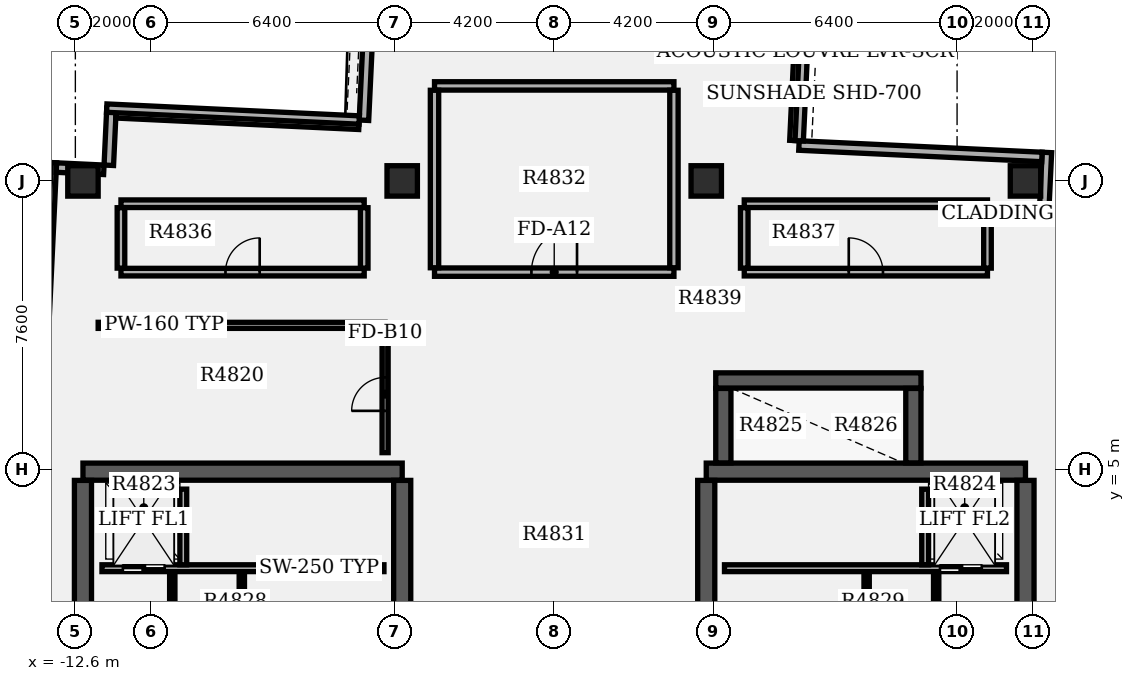
"""IFC4 building model, lengths in metres.
Left out: names, types, materials, properties, quantities, classifications, styles, units other than length and angle.
Written with IfcOpenShell. Run it as: python <this file> out.ifc"""

import sys

from ifc_helpers import new_model, si_unit, direction, frame, frame_2d, origin, origin_2d, place, context, subcontext, project, spatial, rectangle, extrude, element, fill, save


model = new_model("IFC4")
c1 = context("Model", 3, precision=1e-05, world=origin(), true_north=direction((0.0, 1.0)))
c2 = subcontext(c1, "Body", "Model", "MODEL_VIEW")
j1 = project(units=[si_unit("LENGTHUNIT", "METRE"), si_unit("PLANEANGLEUNIT", "RADIAN")], contexts=[c1])
p1 = place(None, origin())
s1 = spatial("IfcSite", under=j1, at=p1, CompositionType="ELEMENT")
p2 = place(p1, origin())
s2 = spatial("IfcBuilding", under=s1, at=p2, CompositionType="ELEMENT")
p3 = place(p2, frame((0.0, 0.0, 321.9)))
s3 = spatial("IfcBuildingStorey", under=s2, at=p3, CompositionType="ELEMENT", Elevation=321.9)
p4 = place(p3, frame((-12.4, 4.95, 0.0), z_axis=(0.0, 0.0, 1.0), x_axis=(1.0, 0.0, 0.0)))
e1 = element("IfcWall", 1, at=p4, inside=s3, PredefinedType="SHEAR", context=c2, shape_type="SweptSolid", body=[
    extrude(rectangle(XDim=8.4, YDim=0.45, at=frame_2d((4.2, 0.0))), origin(), (0.0, 0.0, 1.0), 4.12),
])
p5 = place(p3, frame((-12.4, -6.62, 0.0), z_axis=(0.0, 0.0, 1.0), x_axis=(0.0, 1.0, 0.0)))
e2 = element("IfcWall", 2, at=p5, inside=s3, PredefinedType="SHEAR", context=c2, shape_type="SweptSolid", body=[
    extrude(rectangle(XDim=11.34, YDim=0.45, at=frame_2d((5.67, 0.0))), origin(), (0.0, 0.0, 1.0), 4.12),
])
p6 = place(p3, frame((-4.0, -6.62, 0.0), z_axis=(0.0, 0.0, 1.0), x_axis=(0.0, 1.0, 0.0)))
e3 = element("IfcWall", 3, at=p6, inside=s3, PredefinedType="SHEAR", context=c2, shape_type="SweptSolid", body=[
    extrude(rectangle(XDim=11.34, YDim=0.45, at=frame_2d((5.67, 0.0))), origin(), (0.0, 0.0, 1.0), 4.12),
])
p7 = place(p6, frame((1.37, 0.0, 0.0)))
e4 = element("IfcOpeningElement", 4, at=p7, cuts=e3, PredefinedType="OPENING", context=c2, shape_type="SweptSolid", body=[
    extrude(rectangle(XDim=1.05, YDim=2.15, at=frame_2d((0.525, 1.075))), frame((0.0, 0.235, 0.0), z_axis=(0.0, -1.0, 0.0), x_axis=(1.0, 0.0, 0.0)), (0.0, 0.0, 1.0), 0.47),
])
p8 = place(p6, frame((6.97, 0.0, 0.0)))
e5 = element("IfcOpeningElement", 5, at=p8, cuts=e3, PredefinedType="OPENING", context=c2, shape_type="SweptSolid", body=[
    extrude(rectangle(XDim=1.05, YDim=2.15, at=frame_2d((0.525, 1.075))), frame((0.0, 0.235, 0.0), z_axis=(0.0, -1.0, 0.0), x_axis=(1.0, 0.0, 0.0)), (0.0, 0.0, 1.0), 0.47),
])
p9 = place(p3, frame((4.0, 4.95, 0.0), z_axis=(0.0, 0.0, 1.0), x_axis=(1.0, 0.0, 0.0)))
e6 = element("IfcWall", 6, at=p9, inside=s3, PredefinedType="SHEAR", context=c2, shape_type="SweptSolid", body=[
    extrude(rectangle(XDim=8.4, YDim=0.45, at=frame_2d((4.2, 0.0))), origin(), (0.0, 0.0, 1.0), 4.12),
])
p10 = place(p3, frame((4.0, -6.62, 0.0), z_axis=(0.0, 0.0, 1.0), x_axis=(0.0, 1.0, 0.0)))
e7 = element("IfcWall", 7, at=p10, inside=s3, PredefinedType="SHEAR", context=c2, shape_type="SweptSolid", body=[
    extrude(rectangle(XDim=11.34, YDim=0.45, at=frame_2d((5.67, 0.0))), origin(), (0.0, 0.0, 1.0), 4.12),
])
p11 = place(p10, frame((1.37, 0.0, 0.0)))
e8 = element("IfcOpeningElement", 8, at=p11, cuts=e7, PredefinedType="OPENING", context=c2, shape_type="SweptSolid", body=[
    extrude(rectangle(XDim=1.05, YDim=2.15, at=frame_2d((0.525, 1.075))), frame((0.0, 0.235, 0.0), z_axis=(0.0, -1.0, 0.0), x_axis=(1.0, 0.0, 0.0)), (0.0, 0.0, 1.0), 0.47),
])
p12 = place(p10, frame((6.97, 0.0, 0.0)))
e9 = element("IfcOpeningElement", 9, at=p12, cuts=e7, PredefinedType="OPENING", context=c2, shape_type="SweptSolid", body=[
    extrude(rectangle(XDim=1.05, YDim=2.15, at=frame_2d((0.525, 1.075))), frame((0.0, 0.235, 0.0), z_axis=(0.0, -1.0, 0.0), x_axis=(1.0, 0.0, 0.0)), (0.0, 0.0, 1.0), 0.47),
])
p13 = place(p3, frame((12.4, -6.62, 0.0), z_axis=(0.0, 0.0, 1.0), x_axis=(0.0, 1.0, 0.0)))
e10 = element("IfcWall", 10, at=p13, inside=s3, PredefinedType="SHEAR", context=c2, shape_type="SweptSolid", body=[
    extrude(rectangle(XDim=11.34, YDim=0.45, at=frame_2d((5.67, 0.0))), origin(), (0.0, 0.0, 1.0), 4.12),
])
p14 = place(p3, frame((4.45, 5.18, 0.0), z_axis=(0.0, 0.0, 1.0), x_axis=(0.0, 1.0, 0.0)))
e11 = element("IfcWall", 11, at=p14, inside=s3, PredefinedType="SHEAR", context=c2, shape_type="SweptSolid", body=[
    extrude(rectangle(XDim=1.96, YDim=0.4, at=frame_2d((0.98, 0.0))), origin(), (0.0, 0.0, 1.0), 4.12),
])
p15 = place(p3, frame((4.25, 7.35, 0.0), z_axis=(0.0, 0.0, 1.0), x_axis=(1.0, 0.0, 0.0)))
e12 = element("IfcWall", 12, at=p15, inside=s3, PredefinedType="SHEAR", context=c2, shape_type="SweptSolid", body=[
    extrude(rectangle(XDim=5.4, YDim=0.4, at=frame_2d((2.7, 0.0))), origin(), (0.0, 0.0, 1.0), 4.12),
])
p16 = place(p3, frame((9.45, 5.18, 0.0), z_axis=(0.0, 0.0, 1.0), x_axis=(0.0, 1.0, 0.0)))
e13 = element("IfcWall", 13, at=p16, inside=s3, PredefinedType="SHEAR", context=c2, shape_type="SweptSolid", body=[
    extrude(rectangle(XDim=1.96, YDim=0.4, at=frame_2d((0.98, 0.0))), origin(), (0.0, 0.0, 1.0), 4.12),
])
for number, where, z_axis, x_axis in (
    (14, (12.4, 12.6, 0.0), (0.0, 0.0, 1.0), (1.0, 0.0, 0.0)),
    (15, (-12.4, 12.6, 0.0), (0.0, 0.0, 1.0), (1.0, 0.0, 0.0)),
    (16, (4.0, 12.6, 0.0), (0.0, 0.0, 1.0), (1.0, 0.0, 0.0)),
    (17, (-4.0, 12.6, 0.0), (0.0, 0.0, 1.0), (1.0, 0.0, 0.0)),
):
    element("IfcColumn", number, at=place(p3, frame(where, z_axis=z_axis, x_axis=x_axis)), inside=s3, PredefinedType="COLUMN", context=c2, shape_type="SweptSolid", body=[
        extrude(rectangle(XDim=0.8, YDim=0.8, at=origin_2d()), origin(), (0.0, 0.0, 1.0), 5.2),
    ])
for number, where, z_axis, x_axis in (
    (18, (6.321, 13.662, 0.0), (0.0, 0.0, 1.0), (0.047, 0.999, 0.0)),
    (19, (-4.889, 16.704, 0.0), (0.0, 0.0, 1.0), (-0.047, -0.999, 0.0)),
):
    element("IfcWall", number, at=place(p3, frame(where, z_axis=z_axis, x_axis=x_axis)), inside=s3, PredefinedType="STANDARD", context=c2, shape_type="SweptSolid", body=[
        extrude(rectangle(XDim=2.51, YDim=0.25, at=frame_2d((1.255, 0.0))), origin(), (0.0, 0.0, 1.0), 3.6),
    ])
p17 = place(p3, frame((14.26, 11.661, 0.0), z_axis=(0.0, 0.0, 1.0), x_axis=(-0.998882234619, 0.047268185526, 0.0)))
e20 = element("IfcWall", 20, at=p17, inside=s3, PredefinedType="STANDARD", context=c2, shape_type="SweptSolid", body=[
    extrude(rectangle(XDim=1.25, YDim=0.25, at=frame_2d((0.625, 0.0))), origin(), (0.0, 0.0, 1.0), 3.6),
])
p18 = place(p3, frame((12.893, 11.851, 0.0), z_axis=(0.0, 0.0, 1.0), x_axis=(0.047039284441, 0.99889304018, 0.0)))
e21 = element("IfcWall", 21, at=p18, inside=s3, PredefinedType="STANDARD", context=c2, shape_type="SweptSolid", body=[
    extrude(rectangle(XDim=1.5, YDim=0.25, at=frame_2d((0.75, 0.0))), origin(), (0.0, 0.0, 1.0), 3.6),
])
p19 = place(p3, frame((12.833, 13.23, 0.0), z_axis=(0.0, 0.0, 1.0), x_axis=(-0.998889611537, 0.04711203629, 0.0)))
e22 = element("IfcWall", 22, at=p19, inside=s3, PredefinedType="STANDARD", context=c2, shape_type="SweptSolid", body=[
    extrude(rectangle(XDim=6.4, YDim=0.25, at=frame_2d((3.2, 0.0))), origin(), (0.0, 0.0, 1.0), 3.6),
])
p20 = place(p3, frame((-13.543, 6.19, 0.0), z_axis=(0.0, 0.0, 1.0), x_axis=(0.047094441475, 0.998890441231, 0.0)))
e23 = element("IfcWall", 23, at=p20, inside=s3, PredefinedType="STANDARD", context=c2, shape_type="SweptSolid", body=[
    extrude(rectangle(XDim=6.9, YDim=0.25, at=frame_2d((3.45, 0.0))), origin(), (0.0, 0.0, 1.0), 3.6),
])
p21 = place(p3, frame((-13.099, 12.951, 0.0), z_axis=(0.0, 0.0, 1.0), x_axis=(0.99889143794, -0.047073296156, 0.0)))
e24 = element("IfcWall", 24, at=p21, inside=s3, PredefinedType="STANDARD", context=c2, shape_type="SweptSolid", body=[
    extrude(rectangle(XDim=1.25, YDim=0.25, at=frame_2d((0.625, 0.0))), origin(), (0.0, 0.0, 1.0), 3.6),
])
p22 = place(p3, frame((-11.72, 13.011, 0.0), z_axis=(0.0, 0.0, 1.0), x_axis=(0.047194015166, 0.99888574168, 0.0)))
e25 = element("IfcWall", 25, at=p22, inside=s3, PredefinedType="STANDARD", context=c2, shape_type="SweptSolid", body=[
    extrude(rectangle(XDim=1.5, YDim=0.25, at=frame_2d((0.75, 0.0))), origin(), (0.0, 0.0, 1.0), 3.6),
])
p23 = place(p3, frame((-11.531, 14.379, 0.0), z_axis=(0.0, 0.0, 1.0), x_axis=(0.998889611537, -0.04711203629, 0.0)))
e26 = element("IfcWall", 26, at=p23, inside=s3, PredefinedType="STANDARD", context=c2, shape_type="SweptSolid", body=[
    extrude(rectangle(XDim=6.4, YDim=0.25, at=frame_2d((3.2, 0.0))), origin(), (0.0, 0.0, 1.0), 3.6),
])
p24 = place(p3, frame((6.446, 13.656, 5.2), z_axis=(0.0, 0.0, 1.0), x_axis=(0.047056642383, 0.998892222618, 0.0)))
e27 = element("IfcWall", 27, at=p24, inside=s3, PredefinedType="PARAPET", context=c2, shape_type="SweptSolid", body=[
    extrude(rectangle(XDim=2.76, YDim=0.22, at=frame_2d((1.38, 0.0))), origin(), (0.0, 0.0, 1.0), 1.1),
])
p25 = place(p3, frame((-5.132, 14.202, 5.2), z_axis=(0.0, 0.0, 1.0), x_axis=(-0.998888395554, 0.047137811014, 0.0)))
e28 = element("IfcWall", 28, at=p25, inside=s3, PredefinedType="PARAPET", context=c2, shape_type="SweptSolid", body=[
    extrude(rectangle(XDim=6.65, YDim=0.22, at=frame_2d((3.325, 0.0))), origin(), (0.0, 0.0, 1.0), 1.1),
])
p26 = place(p3, frame((-12.0, 8.8, 0.0), z_axis=(0.0, 0.0, 1.0), x_axis=(1.0, 0.0, 0.0)))
e29 = element("IfcWall", 29, at=p26, inside=s3, PredefinedType="PARTITIONING", context=c2, shape_type="SweptSolid", body=[
    extrude(rectangle(XDim=7.55, YDim=0.16, at=frame_2d((3.775, 0.0))), origin(), (0.0, 0.0, 1.0), 3.59),
])
p27 = place(p3, frame((-4.45, 5.45, 0.0), z_axis=(0.0, 0.0, 1.0), x_axis=(0.0, 1.0, 0.0)))
e30 = element("IfcWall", 30, at=p27, inside=s3, PredefinedType="PARTITIONING", context=c2, shape_type="SweptSolid", body=[
    extrude(rectangle(XDim=3.26, YDim=0.16, at=frame_2d((1.63, 0.0))), origin(), (0.0, 0.0, 1.0), 3.59),
])
p28 = place(p27, frame((1.1, 0.0, 0.0)))
e31 = element("IfcOpeningElement", 31, at=p28, cuts=e30, PredefinedType="OPENING", context=c2, shape_type="SweptSolid", body=[
    extrude(rectangle(XDim=0.88, YDim=2.1, at=frame_2d((0.44, 1.05))), frame((0.0, 0.09, 0.0), z_axis=(0.0, -1.0, 0.0), x_axis=(1.0, 0.0, 0.0)), (0.0, 0.0, 1.0), 0.18),
])
p29 = place(p3, frame((-11.9, 2.41, 0.0), z_axis=(0.0, 0.0, 1.0), x_axis=(1.0, 0.0, 0.0)))
e32 = element("IfcWall", 32, at=p29, inside=s3, PredefinedType="SOLIDWALL", context=c2, shape_type="SweptSolid", body=[
    extrude(rectangle(XDim=7.42, YDim=0.18, at=frame_2d((3.71, 0.0))), origin(), (0.0, 0.0, 1.0), 3.59),
])
p30 = place(p29, frame((0.55, 0.0, 0.0)))
e33 = element("IfcOpeningElement", 33, at=p30, cuts=e32, PredefinedType="OPENING", context=c2, shape_type="SweptSolid", body=[
    extrude(rectangle(XDim=1.1, YDim=2.15, at=frame_2d((0.55, 1.075))), frame((0.0, 0.1, 0.0), z_axis=(0.0, -1.0, 0.0), x_axis=(1.0, 0.0, 0.0)), (0.0, 0.0, 1.0), 0.2),
])
p31 = place(p3, frame((4.48, 2.41, 0.0), z_axis=(0.0, 0.0, 1.0), x_axis=(1.0, 0.0, 0.0)))
e34 = element("IfcWall", 34, at=p31, inside=s3, PredefinedType="SOLIDWALL", context=c2, shape_type="SweptSolid", body=[
    extrude(rectangle(XDim=7.42, YDim=0.18, at=frame_2d((3.71, 0.0))), origin(), (0.0, 0.0, 1.0), 3.59),
])
p32 = place(p31, frame((5.67, 0.0, 0.0)))
e35 = element("IfcOpeningElement", 35, at=p32, cuts=e34, PredefinedType="OPENING", context=c2, shape_type="SweptSolid", body=[
    extrude(rectangle(XDim=1.1, YDim=2.15, at=frame_2d((0.55, 1.075))), frame((0.0, 0.1, 0.0), z_axis=(0.0, -1.0, 0.0), x_axis=(1.0, 0.0, 0.0)), (0.0, 0.0, 1.0), 0.2),
])
for number, where, z_axis, x_axis in (
    (36, (-9.76, 2.5, 0.0), (0.0, 0.0, 1.0), (0.0, 1.0, 0.0)),
    (37, (9.76, 2.5, 0.0), (0.0, 0.0, 1.0), (0.0, 1.0, 0.0)),
):
    element("IfcWall", number, at=place(p3, frame(where, z_axis=z_axis, x_axis=x_axis)), inside=s3, PredefinedType="SOLIDWALL", context=c2, shape_type="SweptSolid", body=[
        extrude(rectangle(XDim=1.99, YDim=0.18, at=frame_2d((0.995, 0.0))), origin(), (0.0, 0.0, 1.0), 3.59),
    ])
p33 = place(p3, frame((-8.22, -0.65, 0.0), z_axis=(0.0, 0.0, 1.0), x_axis=(0.0, 1.0, 0.0)))
e38 = element("IfcWall", 38, at=p33, inside=s3, PredefinedType="SOLIDWALL", context=c2, shape_type="SweptSolid", body=[
    extrude(rectangle(XDim=2.96, YDim=0.14, at=frame_2d((1.48, 0.0))), origin(), (0.0, 0.0, 1.0), 3.59),
])
p34 = place(p33, frame((0.55, 0.0, 0.0)))
e39 = element("IfcOpeningElement", 39, at=p34, cuts=e38, PredefinedType="OPENING", context=c2, shape_type="SweptSolid", body=[
    extrude(rectangle(XDim=0.88, YDim=2.1, at=frame_2d((0.44, 1.05))), frame((0.0, 0.08, 0.0), z_axis=(0.0, -1.0, 0.0), x_axis=(1.0, 0.0, 0.0)), (0.0, 0.0, 1.0), 0.16),
])
p35 = place(p3, frame((8.22, -0.65, 0.0), z_axis=(0.0, 0.0, 1.0), x_axis=(0.0, 1.0, 0.0)))
e40 = element("IfcWall", 40, at=p35, inside=s3, PredefinedType="SOLIDWALL", context=c2, shape_type="SweptSolid", body=[
    extrude(rectangle(XDim=2.96, YDim=0.14, at=frame_2d((1.48, 0.0))), origin(), (0.0, 0.0, 1.0), 3.59),
])
p36 = place(p35, frame((0.55, 0.0, 0.0)))
e41 = element("IfcOpeningElement", 41, at=p36, cuts=e40, PredefinedType="OPENING", context=c2, shape_type="SweptSolid", body=[
    extrude(rectangle(XDim=0.88, YDim=2.1, at=frame_2d((0.44, 1.05))), frame((0.0, 0.08, 0.0), z_axis=(0.0, -1.0, 0.0), x_axis=(1.0, 0.0, 0.0)), (0.0, 0.0, 1.0), 0.16),
])
p37 = place(p3, frame((-10.05, -0.652, 0.0), z_axis=(0.0, 0.0, 1.0), x_axis=(0.0, 1.0, 0.0)))
e42 = element("IfcWall", 42, at=p37, inside=s3, PredefinedType="PARTITIONING", context=c2, shape_type="SweptSolid", body=[
    extrude(rectangle(XDim=2.962, YDim=0.14, at=frame_2d((1.481, 0.0))), origin(), (0.0, 0.0, 1.0), 3.59),
])
p38 = place(p37, frame((0.85, 0.0, 0.0)))
e43 = element("IfcOpeningElement", 43, at=p38, cuts=e42, PredefinedType="OPENING", context=c2, shape_type="SweptSolid", body=[
    extrude(rectangle(XDim=0.88, YDim=2.1, at=frame_2d((0.44, 1.05))), frame((0.0, 0.08, 0.0), z_axis=(0.0, -1.0, 0.0), x_axis=(1.0, 0.0, 0.0)), (0.0, 0.0, 1.0), 0.16),
])
p39 = place(p3, frame((10.05, -0.652, 0.0), z_axis=(0.0, 0.0, 1.0), x_axis=(0.0, 1.0, 0.0)))
e44 = element("IfcWall", 44, at=p39, inside=s3, PredefinedType="PARTITIONING", context=c2, shape_type="SweptSolid", body=[
    extrude(rectangle(XDim=2.962, YDim=0.14, at=frame_2d((1.481, 0.0))), origin(), (0.0, 0.0, 1.0), 3.59),
])
p40 = place(p39, frame((0.85, 0.0, 0.0)))
e45 = element("IfcOpeningElement", 45, at=p40, cuts=e44, PredefinedType="OPENING", context=c2, shape_type="SweptSolid", body=[
    extrude(rectangle(XDim=0.88, YDim=2.1, at=frame_2d((0.44, 1.05))), frame((0.0, 0.08, 0.0), z_axis=(0.0, -1.0, 0.0), x_axis=(1.0, 0.0, 0.0)), (0.0, 0.0, 1.0), 0.16),
])
p41 = place(p3, frame((-3.15, 10.2, 0.0), z_axis=(0.0, 0.0, 1.0), x_axis=(1.0, 0.0, 0.0)))
e46 = element("IfcWall", 46, at=p41, inside=s3, PredefinedType="PARTITIONING", context=c2, shape_type="SweptSolid", body=[
    extrude(rectangle(XDim=6.3, YDim=0.22, at=frame_2d((3.15, 0.0))), origin(), (0.0, 0.0, 1.0), 3.59),
])
p42 = place(p41, frame((2.55, 0.0, 0.0)))
e47 = element("IfcOpeningElement", 47, at=p42, cuts=e46, PredefinedType="OPENING", context=c2, shape_type="SweptSolid", body=[
    extrude(rectangle(XDim=1.2, YDim=2.15, at=frame_2d((0.6, 1.075))), frame((0.0, 0.12, 0.0), z_axis=(0.0, -1.0, 0.0), x_axis=(1.0, 0.0, 0.0)), (0.0, 0.0, 1.0), 0.24),
])
p43 = place(p3, frame((-3.15, 15.1, 0.0), z_axis=(0.0, 0.0, 1.0), x_axis=(1.0, 0.0, 0.0)))
e48 = element("IfcWall", 48, at=p43, inside=s3, PredefinedType="PARTITIONING", context=c2, shape_type="SweptSolid", body=[
    extrude(rectangle(XDim=6.3, YDim=0.22, at=frame_2d((3.15, 0.0))), origin(), (0.0, 0.0, 1.0), 3.59),
])
for number, where, z_axis, x_axis in (
    (49, (-3.15, 10.315, 0.0), (0.0, 0.0, 1.0), (0.0, 1.0, 0.0)),
    (50, (3.15, 10.315, 0.0), (0.0, 0.0, 1.0), (0.0, 1.0, 0.0)),
):
    element("IfcWall", number, at=place(p3, frame(where, z_axis=z_axis, x_axis=x_axis)), inside=s3, PredefinedType="PARTITIONING", context=c2, shape_type="SweptSolid", body=[
        extrude(rectangle(XDim=4.67, YDim=0.22, at=frame_2d((2.335, 0.0))), origin(), (0.0, 0.0, 1.0), 3.59),
    ])
p44 = place(p3, frame((-11.4, 10.2, 0.0), z_axis=(0.0, 0.0, 1.0), x_axis=(1.0, 0.0, 0.0)))
e51 = element("IfcWall", 51, at=p44, inside=s3, PredefinedType="PARTITIONING", context=c2, shape_type="SweptSolid", body=[
    extrude(rectangle(XDim=6.4, YDim=0.2, at=frame_2d((3.2, 0.0))), origin(), (0.0, 0.0, 1.0), 3.59),
])
p45 = place(p44, frame((2.75, 0.0, 0.0)))
e52 = element("IfcOpeningElement", 52, at=p45, cuts=e51, PredefinedType="OPENING", context=c2, shape_type="SweptSolid", body=[
    extrude(rectangle(XDim=0.9, YDim=2.15, at=frame_2d((0.45, 1.075))), frame((0.0, 0.11, 0.0), z_axis=(0.0, -1.0, 0.0), x_axis=(1.0, 0.0, 0.0)), (0.0, 0.0, 1.0), 0.22),
])
p46 = place(p3, frame((-11.4, 12.0, 0.0), z_axis=(0.0, 0.0, 1.0), x_axis=(1.0, 0.0, 0.0)))
e53 = element("IfcWall", 53, at=p46, inside=s3, PredefinedType="PARTITIONING", context=c2, shape_type="SweptSolid", body=[
    extrude(rectangle(XDim=6.4, YDim=0.2, at=frame_2d((3.2, 0.0))), origin(), (0.0, 0.0, 1.0), 3.59),
])
for number, where, z_axis, x_axis in (
    (54, (-11.4, 10.305, 0.0), (0.0, 0.0, 1.0), (0.0, 1.0, 0.0)),
    (55, (-5.0, 10.305, 0.0), (0.0, 0.0, 1.0), (0.0, 1.0, 0.0)),
):
    element("IfcWall", number, at=place(p3, frame(where, z_axis=z_axis, x_axis=x_axis)), inside=s3, PredefinedType="PARTITIONING", context=c2, shape_type="SweptSolid", body=[
        extrude(rectangle(XDim=1.59, YDim=0.2, at=frame_2d((0.795, 0.0))), origin(), (0.0, 0.0, 1.0), 3.59),
    ])
p47 = place(p3, frame((5.0, 10.2, 0.0), z_axis=(0.0, 0.0, 1.0), x_axis=(1.0, 0.0, 0.0)))
e56 = element("IfcWall", 56, at=p47, inside=s3, PredefinedType="PARTITIONING", context=c2, shape_type="SweptSolid", body=[
    extrude(rectangle(XDim=6.4, YDim=0.2, at=frame_2d((3.2, 0.0))), origin(), (0.0, 0.0, 1.0), 3.59),
])
p48 = place(p47, frame((2.75, 0.0, 0.0)))
e57 = element("IfcOpeningElement", 57, at=p48, cuts=e56, PredefinedType="OPENING", context=c2, shape_type="SweptSolid", body=[
    extrude(rectangle(XDim=0.9, YDim=2.15, at=frame_2d((0.45, 1.075))), frame((0.0, 0.11, 0.0), z_axis=(0.0, -1.0, 0.0), x_axis=(1.0, 0.0, 0.0)), (0.0, 0.0, 1.0), 0.22),
])
p49 = place(p3, frame((5.0, 12.0, 0.0), z_axis=(0.0, 0.0, 1.0), x_axis=(1.0, 0.0, 0.0)))
e58 = element("IfcWall", 58, at=p49, inside=s3, PredefinedType="PARTITIONING", context=c2, shape_type="SweptSolid", body=[
    extrude(rectangle(XDim=6.4, YDim=0.2, at=frame_2d((3.2, 0.0))), origin(), (0.0, 0.0, 1.0), 3.59),
])
for number, where, z_axis, x_axis in (
    (59, (5.0, 10.305, 0.0), (0.0, 0.0, 1.0), (0.0, 1.0, 0.0)),
    (60, (11.4, 10.305, 0.0), (0.0, 0.0, 1.0), (0.0, 1.0, 0.0)),
):
    element("IfcWall", number, at=place(p3, frame(where, z_axis=z_axis, x_axis=x_axis)), inside=s3, PredefinedType="PARTITIONING", context=c2, shape_type="SweptSolid", body=[
        extrude(rectangle(XDim=1.59, YDim=0.2, at=frame_2d((0.795, 0.0))), origin(), (0.0, 0.0, 1.0), 3.59),
    ])
p50 = place(p28, origin())
e61 = element("IfcDoor", 61, at=p50, inside=s3, OperationType="SINGLE_SWING_LEFT", PredefinedType="DOOR", context=c2, shape_type="SweptSolid", body=[
    extrude(rectangle(XDim=0.88, YDim=2.1, at=frame_2d((0.44, 1.05))), frame((0.0, 0.025, 0.0), z_axis=(0.0, -1.0, 0.0), x_axis=(1.0, 0.0, 0.0)), (0.0, 0.0, 1.0), 0.05),
])
fill(e31, e61)
p51 = place(p30, origin())
e62 = element("IfcDoor", 62, at=p51, inside=s3, OperationType="DOUBLE_DOOR_SLIDING", PredefinedType="DOOR", context=c2, shape_type="SweptSolid", body=[
    extrude(rectangle(XDim=1.1, YDim=2.15, at=frame_2d((0.55, 1.075))), frame((0.0, 0.025, 0.0), z_axis=(0.0, -1.0, 0.0), x_axis=(1.0, 0.0, 0.0)), (0.0, 0.0, 1.0), 0.05),
])
fill(e33, e62)
p52 = place(p32, origin())
e63 = element("IfcDoor", 63, at=p52, inside=s3, OperationType="DOUBLE_DOOR_SLIDING", PredefinedType="DOOR", context=c2, shape_type="SweptSolid", body=[
    extrude(rectangle(XDim=1.1, YDim=2.15, at=frame_2d((0.55, 1.075))), frame((0.0, 0.025, 0.0), z_axis=(0.0, -1.0, 0.0), x_axis=(1.0, 0.0, 0.0)), (0.0, 0.0, 1.0), 0.05),
])
fill(e35, e63)
p53 = place(p42, origin())
e64 = element("IfcDoor", 64, at=p53, inside=s3, OperationType="SINGLE_SWING_RIGHT", PredefinedType="DOOR", context=c2, shape_type="SweptSolid", body=[
    extrude(rectangle(XDim=1.2, YDim=2.15, at=frame_2d((0.6, 1.075))), frame((0.0, 0.025, 0.0), z_axis=(0.0, -1.0, 0.0), x_axis=(1.0, 0.0, 0.0)), (0.0, 0.0, 1.0), 0.05),
])
fill(e47, e64)
p54 = place(p45, origin())
e65 = element("IfcDoor", 65, at=p54, inside=s3, OperationType="SINGLE_SWING_RIGHT", PredefinedType="DOOR", context=c2, shape_type="SweptSolid", body=[
    extrude(rectangle(XDim=0.9, YDim=2.15, at=frame_2d((0.45, 1.075))), frame((0.0, 0.025, 0.0), z_axis=(0.0, -1.0, 0.0), x_axis=(1.0, 0.0, 0.0)), (0.0, 0.0, 1.0), 0.05),
])
fill(e52, e65)
p55 = place(p48, origin())
e66 = element("IfcDoor", 66, at=p55, inside=s3, OperationType="SINGLE_SWING_LEFT", PredefinedType="DOOR", context=c2, shape_type="SweptSolid", body=[
    extrude(rectangle(XDim=0.9, YDim=2.15, at=frame_2d((0.45, 1.075))), frame((0.0, 0.025, 0.0), z_axis=(0.0, -1.0, 0.0), x_axis=(1.0, 0.0, 0.0)), (0.0, 0.0, 1.0), 0.05),
])
fill(e57, e66)
save(model, sys.argv[1])
